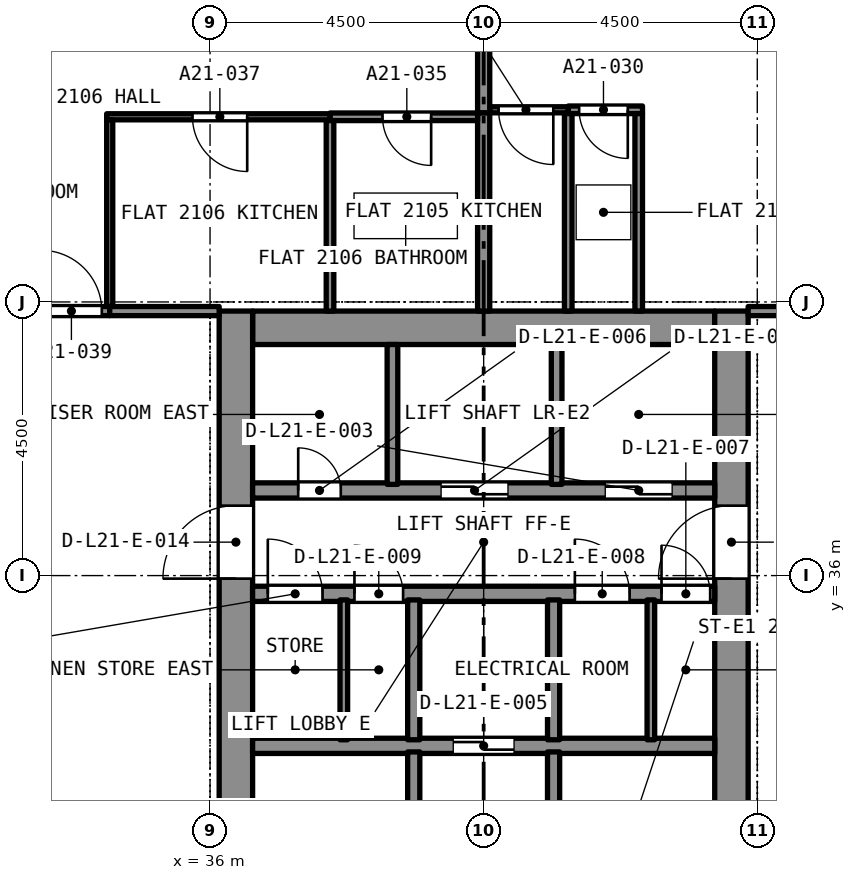
"""IFC4 building model, lengths in metres.
Left out: names, types, materials, properties, quantities, classifications, styles, units other than length and angle.
Written with IfcOpenShell. Run it as: python <this file> out.ifc"""

import sys

from ifc_helpers import new_model, si_unit, direction, frame, frame_2d, origin, place, context, subcontext, project, spatial, rectangle, extrude, element, fill, save


model = new_model("IFC4")
c1 = context("Model", 3, precision=1e-05, world=origin(), true_north=direction((0.0, 1.0)))
c2 = subcontext(c1, "Body", "Model", "MODEL_VIEW")
j1 = project(units=[si_unit("LENGTHUNIT", "METRE"), si_unit("PLANEANGLEUNIT", "RADIAN")], contexts=[c1])
p1 = place(None, origin())
s1 = spatial("IfcSite", under=j1, at=p1, CompositionType="ELEMENT")
p2 = place(p1, origin())
s2 = spatial("IfcBuilding", under=s1, at=p2, CompositionType="ELEMENT")
p3 = place(p2, frame((0.0, 0.0, 80.0)))
s3 = spatial("IfcBuildingStorey", under=s2, at=p3, CompositionType="ELEMENT", Elevation=80.0)
p4 = place(p3, frame((36.7, 40.075, 0.0), z_axis=(0.0, 0.0, 1.0), x_axis=(1.0, 0.0, 0.0)))
e1 = element("IfcWall", 1, at=p4, inside=s3, PredefinedType="SOLIDWALL", context=c2, shape_type="SweptSolid", body=[
    extrude(rectangle(XDim=7.6, YDim=0.55, at=frame_2d((3.8, 0.0))), origin(), (0.0, 0.0, 1.0), 3.2),
])
p5 = place(p3, frame((36.425, 27.15, 0.0), z_axis=(0.0, 0.0, 1.0), x_axis=(0.0, 1.0, 0.0)))
e2 = element("IfcWall", 2, at=p5, inside=s3, PredefinedType="SOLIDWALL", context=c2, shape_type="SweptSolid", body=[
    extrude(rectangle(XDim=13.2, YDim=0.55, at=frame_2d((6.6, 0.0))), origin(), (0.0, 0.0, 1.0), 3.2),
])
p6 = place(p5, frame((8.8, 0.0, 0.0)))
e3 = element("IfcOpeningElement", 3, at=p6, cuts=e2, PredefinedType="OPENING", context=c2, shape_type="SweptSolid", body=[
    extrude(rectangle(XDim=1.2, YDim=2.1, at=frame_2d((0.6, 1.05))), frame((0.0, 0.285, 0.0), z_axis=(0.0, -1.0, 0.0), x_axis=(1.0, 0.0, 0.0)), (0.0, 0.0, 1.0), 0.57),
])
p7 = place(p3, frame((44.575, 27.15, 0.0), z_axis=(0.0, 0.0, 1.0), x_axis=(0.0, 1.0, 0.0)))
e4 = element("IfcWall", 4, at=p7, inside=s3, PredefinedType="SOLIDWALL", context=c2, shape_type="SweptSolid", body=[
    extrude(rectangle(XDim=13.2, YDim=0.55, at=frame_2d((6.6, 0.0))), origin(), (0.0, 0.0, 1.0), 3.2),
])
p8 = place(p7, frame((8.8, 0.0, 0.0)))
e5 = element("IfcOpeningElement", 5, at=p8, cuts=e4, PredefinedType="OPENING", context=c2, shape_type="SweptSolid", body=[
    extrude(rectangle(XDim=1.2, YDim=2.1, at=frame_2d((0.6, 1.05))), frame((0.0, 0.285, 0.0), z_axis=(0.0, -1.0, 0.0), x_axis=(1.0, 0.0, 0.0)), (0.0, 0.0, 1.0), 0.57),
])
p9 = place(p3, frame((43.113, 43.66, 0.0), z_axis=(0.0, 0.0, 1.0), x_axis=(-1.0, 0.0, 0.0)))
e6 = element("IfcWall", 6, at=p9, inside=s3, PredefinedType="PARTITIONING", context=c2, shape_type="SweptSolid", body=[
    extrude(rectangle(XDim=1.222, YDim=0.125, at=frame_2d((0.611, 0.0))), origin(), (0.0, 0.0, 1.0), 2.9),
])
p10 = place(p9, frame((0.242, 0.0, 0.0)))
e7 = element("IfcOpeningElement", 7, at=p10, cuts=e6, PredefinedType="OPENING", context=c2, shape_type="SweptSolid", body=[
    extrude(rectangle(XDim=0.8, YDim=2.1, at=frame_2d((0.4, 1.05))), frame((0.0, 0.073, 0.0), z_axis=(0.0, -1.0, 0.0), x_axis=(1.0, 0.0, 0.0)), (0.0, 0.0, 1.0), 0.145),
])
for number, where, z_axis, x_axis in (
    (8, (43.05, 40.35, 0.0), (0.0, 0.0, 1.0), (0.0, 1.0, 0.0)),
    (9, (41.891, 40.35, 0.0), (0.0, 0.0, 1.0), (0.0, 1.0, 0.0)),
):
    element("IfcWall", number, at=place(p3, frame(where, z_axis=z_axis, x_axis=x_axis)), inside=s3, PredefinedType="PARTITIONING", context=c2, shape_type="SweptSolid", body=[
        extrude(rectangle(XDim=3.247, YDim=0.125, at=frame_2d((1.624, 0.0))), origin(), (0.0, 0.0, 1.0), 2.9),
    ])
p11 = place(p3, frame((41.891, 43.66, 0.0), z_axis=(0.0, 0.0, 1.0), x_axis=(-1.0, 0.0, 0.0)))
e10 = element("IfcWall", 10, at=p11, inside=s3, PredefinedType="PARTITIONING", context=c2, shape_type="SweptSolid", body=[
    extrude(rectangle(XDim=1.291, YDim=0.1, at=frame_2d((0.646, 0.0))), origin(), (0.0, 0.0, 1.0), 2.9),
])
p12 = place(p11, frame((0.246, 0.0, 0.0)))
e11 = element("IfcOpeningElement", 11, at=p12, cuts=e10, PredefinedType="OPENING", context=c2, shape_type="SweptSolid", body=[
    extrude(rectangle(XDim=0.9, YDim=2.1, at=frame_2d((0.45, 1.05))), frame((0.0, 0.06, 0.0), z_axis=(0.0, -1.0, 0.0), x_axis=(1.0, 0.0, 0.0)), (0.0, 0.0, 1.0), 0.12),
])
p13 = place(p3, frame((40.5, 43.61, 0.0), z_axis=(0.0, 0.0, 1.0), x_axis=(0.0, 1.0, 0.0)))
e12 = element("IfcWall", 12, at=p13, inside=s3, PredefinedType="PARTITIONING", context=c2, shape_type="SweptSolid", body=[
    extrude(rectangle(XDim=1.365, YDim=0.2, at=frame_2d((0.683, 0.0))), origin(), (0.0, 0.0, 1.0), 2.9),
])
p14 = place(p3, frame((44.85, 40.35, 0.0), z_axis=(0.0, 0.0, 1.0), x_axis=(1.0, 0.0, 0.0)))
e13 = element("IfcWall", 13, at=p14, inside=s3, PredefinedType="PARTITIONING", context=c2, shape_type="SweptSolid", body=[
    extrude(rectangle(XDim=4.075, YDim=0.15, at=frame_2d((2.038, 0.0))), origin(), (0.0, 0.0, 1.0), 2.9),
])
p15 = place(p14, frame((1.9, 0.0, 0.0)))
e14 = element("IfcOpeningElement", 14, at=p15, cuts=e13, PredefinedType="OPENING", context=c2, shape_type="SweptSolid", body=[
    extrude(rectangle(XDim=1.0, YDim=2.1, at=frame_2d((0.5, 1.05))), frame((0.0, 0.085, 0.0), z_axis=(0.0, -1.0, 0.0), x_axis=(1.0, 0.0, 0.0)), (0.0, 0.0, 1.0), 0.17),
])
p16 = place(p3, frame((40.5, 40.35, 0.0), z_axis=(0.0, 0.0, 1.0), x_axis=(0.0, 1.0, 0.0)))
e15 = element("IfcWall", 15, at=p16, inside=s3, PredefinedType="PARTITIONING", context=c2, shape_type="SweptSolid", body=[
    extrude(rectangle(XDim=3.257, YDim=0.2, at=frame_2d((1.629, 0.0))), origin(), (0.0, 0.0, 1.0), 2.9),
])
p17 = place(p3, frame((40.4, 43.545, 0.0), z_axis=(0.0, 0.0, 1.0), x_axis=(-1.0, 0.0, 0.0)))
e16 = element("IfcWall", 16, at=p17, inside=s3, PredefinedType="PARTITIONING", context=c2, shape_type="SweptSolid", body=[
    extrude(rectangle(XDim=2.427, YDim=0.125, at=frame_2d((1.214, 0.0))), origin(), (0.0, 0.0, 1.0), 2.9),
])
p18 = place(p17, frame((0.764, 0.0, 0.0)))
e17 = element("IfcOpeningElement", 17, at=p18, cuts=e16, PredefinedType="OPENING", context=c2, shape_type="SweptSolid", body=[
    extrude(rectangle(XDim=0.8, YDim=2.1, at=frame_2d((0.4, 1.05))), frame((0.0, 0.073, 0.0), z_axis=(0.0, -1.0, 0.0), x_axis=(1.0, 0.0, 0.0)), (0.0, 0.0, 1.0), 0.145),
])
p19 = place(p3, frame((37.973, 40.35, 0.0), z_axis=(0.0, 0.0, 1.0), x_axis=(0.0, 1.0, 0.0)))
e18 = element("IfcWall", 18, at=p19, inside=s3, PredefinedType="PARTITIONING", context=c2, shape_type="SweptSolid", body=[
    extrude(rectangle(XDim=3.132, YDim=0.125, at=frame_2d((1.566, 0.0))), origin(), (0.0, 0.0, 1.0), 2.9),
])
p20 = place(p3, frame((37.973, 43.545, 0.0), z_axis=(0.0, 0.0, 1.0), x_axis=(-1.0, 0.0, 0.0)))
e19 = element("IfcWall", 19, at=p20, inside=s3, PredefinedType="PARTITIONING", context=c2, shape_type="SweptSolid", body=[
    extrude(rectangle(XDim=3.673, YDim=0.1, at=frame_2d((1.836, 0.0))), origin(), (0.0, 0.0, 1.0), 2.9),
])
p21 = place(p20, frame((1.361, 0.0, 0.0)))
e20 = element("IfcOpeningElement", 20, at=p21, cuts=e19, PredefinedType="OPENING", context=c2, shape_type="SweptSolid", body=[
    extrude(rectangle(XDim=0.9, YDim=2.1, at=frame_2d((0.45, 1.05))), frame((0.0, 0.06, 0.0), z_axis=(0.0, -1.0, 0.0), x_axis=(1.0, 0.0, 0.0)), (0.0, 0.0, 1.0), 0.12),
])
p22 = place(p3, frame((34.35, 40.425, 0.0), z_axis=(0.0, 0.0, 1.0), x_axis=(0.0, 1.0, 0.0)))
e21 = element("IfcWall", 21, at=p22, inside=s3, PredefinedType="PARTITIONING", context=c2, shape_type="SweptSolid", body=[
    extrude(rectangle(XDim=3.07, YDim=0.1, at=frame_2d((1.535, 0.0))), origin(), (0.0, 0.0, 1.0), 2.9),
])
p23 = place(p3, frame((32.075, 40.35, 0.0), z_axis=(0.0, 0.0, 1.0), x_axis=(1.0, 0.0, 0.0)))
e22 = element("IfcWall", 22, at=p23, inside=s3, PredefinedType="PARTITIONING", context=c2, shape_type="SweptSolid", body=[
    extrude(rectangle(XDim=2.275, YDim=0.15, at=frame_2d((1.138, 0.0))), origin(), (0.0, 0.0, 1.0), 2.9),
])
p24 = place(p23, frame((1.145, 0.0, 0.0)))
e23 = element("IfcOpeningElement", 23, at=p24, cuts=e22, PredefinedType="OPENING", context=c2, shape_type="SweptSolid", body=[
    extrude(rectangle(XDim=1.0, YDim=2.1, at=frame_2d((0.5, 1.05))), frame((0.0, 0.085, 0.0), z_axis=(0.0, -1.0, 0.0), x_axis=(1.0, 0.0, 0.0)), (0.0, 0.0, 1.0), 0.17),
])
p25 = place(p3, frame((34.35, 40.35, 0.0), z_axis=(0.0, 0.0, 1.0), x_axis=(1.0, 0.0, 0.0)))
e24 = element("IfcWall", 24, at=p25, inside=s3, PredefinedType="PARTITIONING", context=c2, shape_type="SweptSolid", body=[
    extrude(rectangle(XDim=1.8, YDim=0.15, at=frame_2d((0.9, 0.0))), origin(), (0.0, 0.0, 1.0), 2.9),
])
p26 = place(p3, frame((36.7, 33.2, 0.0), z_axis=(0.0, 0.0, 1.0), x_axis=(1.0, 0.0, 0.0)))
e25 = element("IfcWall", 25, at=p26, inside=s3, PredefinedType="SOLIDWALL", context=c2, shape_type="SweptSolid", body=[
    extrude(rectangle(XDim=7.6, YDim=0.25, at=frame_2d((3.8, 0.0))), origin(), (0.0, 0.0, 1.0), 2.9),
])
p27 = place(p26, frame((3.3, 0.0, 0.0)))
e26 = element("IfcOpeningElement", 26, at=p27, cuts=e25, PredefinedType="OPENING", context=c2, shape_type="SweptSolid", body=[
    extrude(rectangle(XDim=1.0, YDim=2.1, at=frame_2d((0.5, 1.05))), frame((0.0, 0.135, 0.0), z_axis=(0.0, -1.0, 0.0), x_axis=(1.0, 0.0, 0.0)), (0.0, 0.0, 1.0), 0.27),
])
p28 = place(p3, frame((36.7, 35.7, 0.0), z_axis=(0.0, 0.0, 1.0), x_axis=(1.0, 0.0, 0.0)))
e27 = element("IfcWall", 27, at=p28, inside=s3, PredefinedType="SOLIDWALL", context=c2, shape_type="SweptSolid", body=[
    extrude(rectangle(XDim=7.6, YDim=0.25, at=frame_2d((3.8, 0.0))), origin(), (0.0, 0.0, 1.0), 2.9),
])
p29 = place(p28, frame((6.725, 0.0, 0.0)))
e28 = element("IfcOpeningElement", 28, at=p29, cuts=e27, PredefinedType="OPENING", context=c2, shape_type="SweptSolid", body=[
    extrude(rectangle(XDim=0.8, YDim=2.1, at=frame_2d((0.4, 1.05))), frame((0.0, 0.135, 0.0), z_axis=(0.0, -1.0, 0.0), x_axis=(1.0, 0.0, 0.0)), (0.0, 0.0, 1.0), 0.27),
])
p30 = place(p28, frame((5.3, 0.0, 0.0)))
e29 = element("IfcOpeningElement", 29, at=p30, cuts=e27, PredefinedType="OPENING", context=c2, shape_type="SweptSolid", body=[
    extrude(rectangle(XDim=0.9, YDim=2.1, at=frame_2d((0.45, 1.05))), frame((0.0, 0.135, 0.0), z_axis=(0.0, -1.0, 0.0), x_axis=(1.0, 0.0, 0.0)), (0.0, 0.0, 1.0), 0.27),
])
p31 = place(p28, frame((1.675, 0.0, 0.0)))
e30 = element("IfcOpeningElement", 30, at=p31, cuts=e27, PredefinedType="OPENING", context=c2, shape_type="SweptSolid", body=[
    extrude(rectangle(XDim=0.8, YDim=2.1, at=frame_2d((0.4, 1.05))), frame((0.0, 0.135, 0.0), z_axis=(0.0, -1.0, 0.0), x_axis=(1.0, 0.0, 0.0)), (0.0, 0.0, 1.0), 0.27),
])
p32 = place(p28, frame((0.25, 0.0, 0.0)))
e31 = element("IfcOpeningElement", 31, at=p32, cuts=e27, PredefinedType="OPENING", context=c2, shape_type="SweptSolid", body=[
    extrude(rectangle(XDim=0.9, YDim=2.1, at=frame_2d((0.45, 1.05))), frame((0.0, 0.135, 0.0), z_axis=(0.0, -1.0, 0.0), x_axis=(1.0, 0.0, 0.0)), (0.0, 0.0, 1.0), 0.27),
])
p33 = place(p3, frame((36.7, 37.4, 0.0), z_axis=(0.0, 0.0, 1.0), x_axis=(1.0, 0.0, 0.0)))
e32 = element("IfcWall", 32, at=p33, inside=s3, PredefinedType="SOLIDWALL", context=c2, shape_type="SweptSolid", body=[
    extrude(rectangle(XDim=7.6, YDim=0.25, at=frame_2d((3.8, 0.0))), origin(), (0.0, 0.0, 1.0), 2.9),
])
p34 = place(p33, frame((5.8, 0.0, 0.0)))
e33 = element("IfcOpeningElement", 33, at=p34, cuts=e32, PredefinedType="OPENING", context=c2, shape_type="SweptSolid", body=[
    extrude(rectangle(XDim=1.1, YDim=2.4, at=frame_2d((0.55, 1.2))), frame((0.0, 0.135, 0.0), z_axis=(0.0, -1.0, 0.0), x_axis=(1.0, 0.0, 0.0)), (0.0, 0.0, 1.0), 0.27),
])
p35 = place(p33, frame((3.1, 0.0, 0.0)))
e34 = element("IfcOpeningElement", 34, at=p35, cuts=e32, PredefinedType="OPENING", context=c2, shape_type="SweptSolid", body=[
    extrude(rectangle(XDim=1.1, YDim=2.4, at=frame_2d((0.55, 1.2))), frame((0.0, 0.135, 0.0), z_axis=(0.0, -1.0, 0.0), x_axis=(1.0, 0.0, 0.0)), (0.0, 0.0, 1.0), 0.27),
])
p36 = place(p33, frame((0.75, 0.0, 0.0)))
e35 = element("IfcOpeningElement", 35, at=p36, cuts=e32, PredefinedType="OPENING", context=c2, shape_type="SweptSolid", body=[
    extrude(rectangle(XDim=0.7, YDim=2.1, at=frame_2d((0.35, 1.05))), frame((0.0, 0.135, 0.0), z_axis=(0.0, -1.0, 0.0), x_axis=(1.0, 0.0, 0.0)), (0.0, 0.0, 1.0), 0.27),
])
p37 = place(p3, frame((41.65, 27.7, 0.0), z_axis=(0.0, 0.0, 1.0), x_axis=(0.0, 1.0, 0.0)))
e36 = element("IfcWall", 36, at=p37, inside=s3, PredefinedType="SOLIDWALL", context=c2, shape_type="SweptSolid", body=[
    extrude(rectangle(XDim=5.4, YDim=0.2, at=frame_2d((2.7, 0.0))), origin(), (0.0, 0.0, 1.0), 2.9),
])
p38 = place(p37, frame((0.2, 0.0, 0.0)))
e37 = element("IfcOpeningElement", 37, at=p38, cuts=e36, PredefinedType="OPENING", context=c2, shape_type="SweptSolid", body=[
    extrude(rectangle(XDim=0.9, YDim=2.1, at=frame_2d((0.45, 1.05))), frame((0.0, 0.11, 0.0), z_axis=(0.0, -1.0, 0.0), x_axis=(1.0, 0.0, 0.0)), (0.0, 0.0, 1.0), 0.22),
])
p39 = place(p3, frame((39.35, 27.7, 0.0), z_axis=(0.0, 0.0, 1.0), x_axis=(0.0, 1.0, 0.0)))
e38 = element("IfcWall", 38, at=p39, inside=s3, PredefinedType="SOLIDWALL", context=c2, shape_type="SweptSolid", body=[
    extrude(rectangle(XDim=5.4, YDim=0.2, at=frame_2d((2.7, 0.0))), origin(), (0.0, 0.0, 1.0), 2.9),
])
p40 = place(p39, frame((0.2, 0.0, 0.0)))
e39 = element("IfcOpeningElement", 39, at=p40, cuts=e38, PredefinedType="OPENING", context=c2, shape_type="SweptSolid", body=[
    extrude(rectangle(XDim=0.9, YDim=2.1, at=frame_2d((0.45, 1.05))), frame((0.0, 0.11, 0.0), z_axis=(0.0, -1.0, 0.0), x_axis=(1.0, 0.0, 0.0)), (0.0, 0.0, 1.0), 0.22),
])
for number, where, z_axis, x_axis in (
    (40, (41.65, 33.3, 0.0), (0.0, 0.0, 1.0), (0.0, 1.0, 0.0)),
    (41, (39.35, 33.3, 0.0), (0.0, 0.0, 1.0), (0.0, 1.0, 0.0)),
):
    element("IfcWall", number, at=place(p3, frame(where, z_axis=z_axis, x_axis=x_axis)), inside=s3, PredefinedType="SOLIDWALL", context=c2, shape_type="SweptSolid", body=[
        extrude(rectangle(XDim=2.3, YDim=0.2, at=frame_2d((1.15, 0.0))), origin(), (0.0, 0.0, 1.0), 2.9),
    ])
for number, where, z_axis, x_axis in (
    (42, (41.7, 37.5, 0.0), (0.0, 0.0, 1.0), (0.0, 1.0, 0.0)),
    (43, (39.0, 37.5, 0.0), (0.0, 0.0, 1.0), (0.0, 1.0, 0.0)),
):
    element("IfcWall", number, at=place(p3, frame(where, z_axis=z_axis, x_axis=x_axis)), inside=s3, PredefinedType="SOLIDWALL", context=c2, shape_type="SweptSolid", body=[
        extrude(rectangle(XDim=2.3, YDim=0.175, at=frame_2d((1.15, 0.0))), origin(), (0.0, 0.0, 1.0), 2.9),
    ])
for number, where, z_axis, x_axis in (
    (44, (43.25, 33.3, 0.0), (0.0, 0.0, 1.0), (0.0, 1.0, 0.0)),
    (45, (38.2, 33.3, 0.0), (0.0, 0.0, 1.0), (0.0, 1.0, 0.0)),
):
    element("IfcWall", number, at=place(p3, frame(where, z_axis=z_axis, x_axis=x_axis)), inside=s3, PredefinedType="PARTITIONING", context=c2, shape_type="SweptSolid", body=[
        extrude(rectangle(XDim=2.3, YDim=0.125, at=frame_2d((1.15, 0.0))), origin(), (0.0, 0.0, 1.0), 2.9),
    ])
p41 = place(p10, origin())
e46 = element("IfcDoor", 46, at=p41, inside=s3, OperationType="SINGLE_SWING_RIGHT", PredefinedType="DOOR", context=c2, shape_type="SweptSolid", body=[
    extrude(rectangle(XDim=0.8, YDim=2.1, at=frame_2d((0.4, 1.05))), frame((0.0, 0.025, 0.0), z_axis=(0.0, -1.0, 0.0), x_axis=(1.0, 0.0, 0.0)), (0.0, 0.0, 1.0), 0.05),
])
fill(e7, e46)
p42 = place(p12, origin())
e47 = element("IfcDoor", 47, at=p42, inside=s3, OperationType="SINGLE_SWING_RIGHT", PredefinedType="DOOR", context=c2, shape_type="SweptSolid", body=[
    extrude(rectangle(XDim=0.9, YDim=2.1, at=frame_2d((0.45, 1.05))), frame((0.0, 0.025, 0.0), z_axis=(0.0, -1.0, 0.0), x_axis=(1.0, 0.0, 0.0)), (0.0, 0.0, 1.0), 0.05),
])
fill(e11, e47)
p43 = place(p18, origin())
e48 = element("IfcDoor", 48, at=p43, inside=s3, OperationType="SINGLE_SWING_LEFT", PredefinedType="DOOR", context=c2, shape_type="SweptSolid", body=[
    extrude(rectangle(XDim=0.8, YDim=2.1, at=frame_2d((0.4, 1.05))), frame((0.0, 0.025, 0.0), z_axis=(0.0, -1.0, 0.0), x_axis=(1.0, 0.0, 0.0)), (0.0, 0.0, 1.0), 0.05),
])
fill(e17, e48)
p44 = place(p21, origin())
e49 = element("IfcDoor", 49, at=p44, inside=s3, OperationType="SINGLE_SWING_LEFT", PredefinedType="DOOR", context=c2, shape_type="SweptSolid", body=[
    extrude(rectangle(XDim=0.9, YDim=2.1, at=frame_2d((0.45, 1.05))), frame((0.0, 0.025, 0.0), z_axis=(0.0, -1.0, 0.0), x_axis=(1.0, 0.0, 0.0)), (0.0, 0.0, 1.0), 0.05),
])
fill(e20, e49)
p45 = place(p24, origin())
e50 = element("IfcDoor", 50, at=p45, inside=s3, OperationType="SINGLE_SWING_RIGHT", PredefinedType="DOOR", context=c2, shape_type="SweptSolid", body=[
    extrude(rectangle(XDim=1.0, YDim=2.1, at=frame_2d((0.5, 1.05))), frame((0.0, 0.025, 0.0), z_axis=(0.0, -1.0, 0.0), x_axis=(1.0, 0.0, 0.0)), (0.0, 0.0, 1.0), 0.05),
])
fill(e23, e50)
p46 = place(p34, origin())
e51 = element("IfcDoor", 51, at=p46, inside=s3, OperationType="SLIDING_TO_LEFT", PredefinedType="DOOR", context=c2, shape_type="SweptSolid", body=[
    extrude(rectangle(XDim=1.1, YDim=2.4, at=frame_2d((0.55, 1.2))), frame((0.0, 0.025, 0.0), z_axis=(0.0, -1.0, 0.0), x_axis=(1.0, 0.0, 0.0)), (0.0, 0.0, 1.0), 0.05),
])
fill(e33, e51)
p47 = place(p35, origin())
e52 = element("IfcDoor", 52, at=p47, inside=s3, OperationType="SLIDING_TO_LEFT", PredefinedType="DOOR", context=c2, shape_type="SweptSolid", body=[
    extrude(rectangle(XDim=1.1, YDim=2.4, at=frame_2d((0.55, 1.2))), frame((0.0, 0.025, 0.0), z_axis=(0.0, -1.0, 0.0), x_axis=(1.0, 0.0, 0.0)), (0.0, 0.0, 1.0), 0.05),
])
fill(e34, e52)
p48 = place(p27, origin())
e53 = element("IfcDoor", 53, at=p48, inside=s3, OperationType="SLIDING_TO_LEFT", PredefinedType="DOOR", context=c2, shape_type="SweptSolid", body=[
    extrude(rectangle(XDim=1.0, YDim=2.1, at=frame_2d((0.5, 1.05))), frame((0.0, 0.025, 0.0), z_axis=(0.0, -1.0, 0.0), x_axis=(1.0, 0.0, 0.0)), (0.0, 0.0, 1.0), 0.05),
])
fill(e26, e53)
p49 = place(p36, origin())
e54 = element("IfcDoor", 54, at=p49, inside=s3, OperationType="SINGLE_SWING_LEFT", PredefinedType="DOOR", context=c2, shape_type="SweptSolid", body=[
    extrude(rectangle(XDim=0.7, YDim=2.1, at=frame_2d((0.35, 1.05))), frame((0.0, 0.025, 0.0), z_axis=(0.0, -1.0, 0.0), x_axis=(1.0, 0.0, 0.0)), (0.0, 0.0, 1.0), 0.05),
])
fill(e35, e54)
p50 = place(p29, origin())
e55 = element("IfcDoor", 55, at=p50, inside=s3, OperationType="SINGLE_SWING_LEFT", PredefinedType="DOOR", context=c2, shape_type="SweptSolid", body=[
    extrude(rectangle(XDim=0.8, YDim=2.1, at=frame_2d((0.4, 1.05))), frame((0.0, 0.025, 0.0), z_axis=(0.0, -1.0, 0.0), x_axis=(1.0, 0.0, 0.0)), (0.0, 0.0, 1.0), 0.05),
])
fill(e28, e55)
p51 = place(p30, origin())
e56 = element("IfcDoor", 56, at=p51, inside=s3, OperationType="SINGLE_SWING_LEFT", PredefinedType="DOOR", context=c2, shape_type="SweptSolid", body=[
    extrude(rectangle(XDim=0.9, YDim=2.1, at=frame_2d((0.45, 1.05))), frame((0.0, 0.025, 0.0), z_axis=(0.0, -1.0, 0.0), x_axis=(1.0, 0.0, 0.0)), (0.0, 0.0, 1.0), 0.05),
])
fill(e29, e56)
p52 = place(p31, origin())
e57 = element("IfcDoor", 57, at=p52, inside=s3, OperationType="SINGLE_SWING_LEFT", PredefinedType="DOOR", context=c2, shape_type="SweptSolid", body=[
    extrude(rectangle(XDim=0.8, YDim=2.1, at=frame_2d((0.4, 1.05))), frame((0.0, 0.025, 0.0), z_axis=(0.0, -1.0, 0.0), x_axis=(1.0, 0.0, 0.0)), (0.0, 0.0, 1.0), 0.05),
])
fill(e30, e57)
p53 = place(p32, origin())
e58 = element("IfcDoor", 58, at=p53, inside=s3, OperationType="SINGLE_SWING_LEFT", PredefinedType="DOOR", context=c2, shape_type="SweptSolid", body=[
    extrude(rectangle(XDim=0.9, YDim=2.1, at=frame_2d((0.45, 1.05))), frame((0.0, 0.025, 0.0), z_axis=(0.0, -1.0, 0.0), x_axis=(1.0, 0.0, 0.0)), (0.0, 0.0, 1.0), 0.05),
])
fill(e31, e58)
p54 = place(p6, origin())
e59 = element("IfcDoor", 59, at=p54, inside=s3, OperationType="SINGLE_SWING_LEFT", PredefinedType="DOOR", context=c2, shape_type="SweptSolid", body=[
    extrude(rectangle(XDim=1.2, YDim=2.1, at=frame_2d((0.6, 1.05))), frame((0.0, 0.025, 0.0), z_axis=(0.0, -1.0, 0.0), x_axis=(1.0, 0.0, 0.0)), (0.0, 0.0, 1.0), 0.05),
])
fill(e3, e59)
p55 = place(p8, origin())
e60 = element("IfcDoor", 60, at=p55, inside=s3, OperationType="SINGLE_SWING_LEFT", PredefinedType="DOOR", context=c2, shape_type="SweptSolid", body=[
    extrude(rectangle(XDim=1.2, YDim=2.1, at=frame_2d((0.6, 1.05))), frame((0.0, 0.025, 0.0), z_axis=(0.0, -1.0, 0.0), x_axis=(1.0, 0.0, 0.0)), (0.0, 0.0, 1.0), 0.05),
])
fill(e5, e60)
save(model, sys.argv[1])
